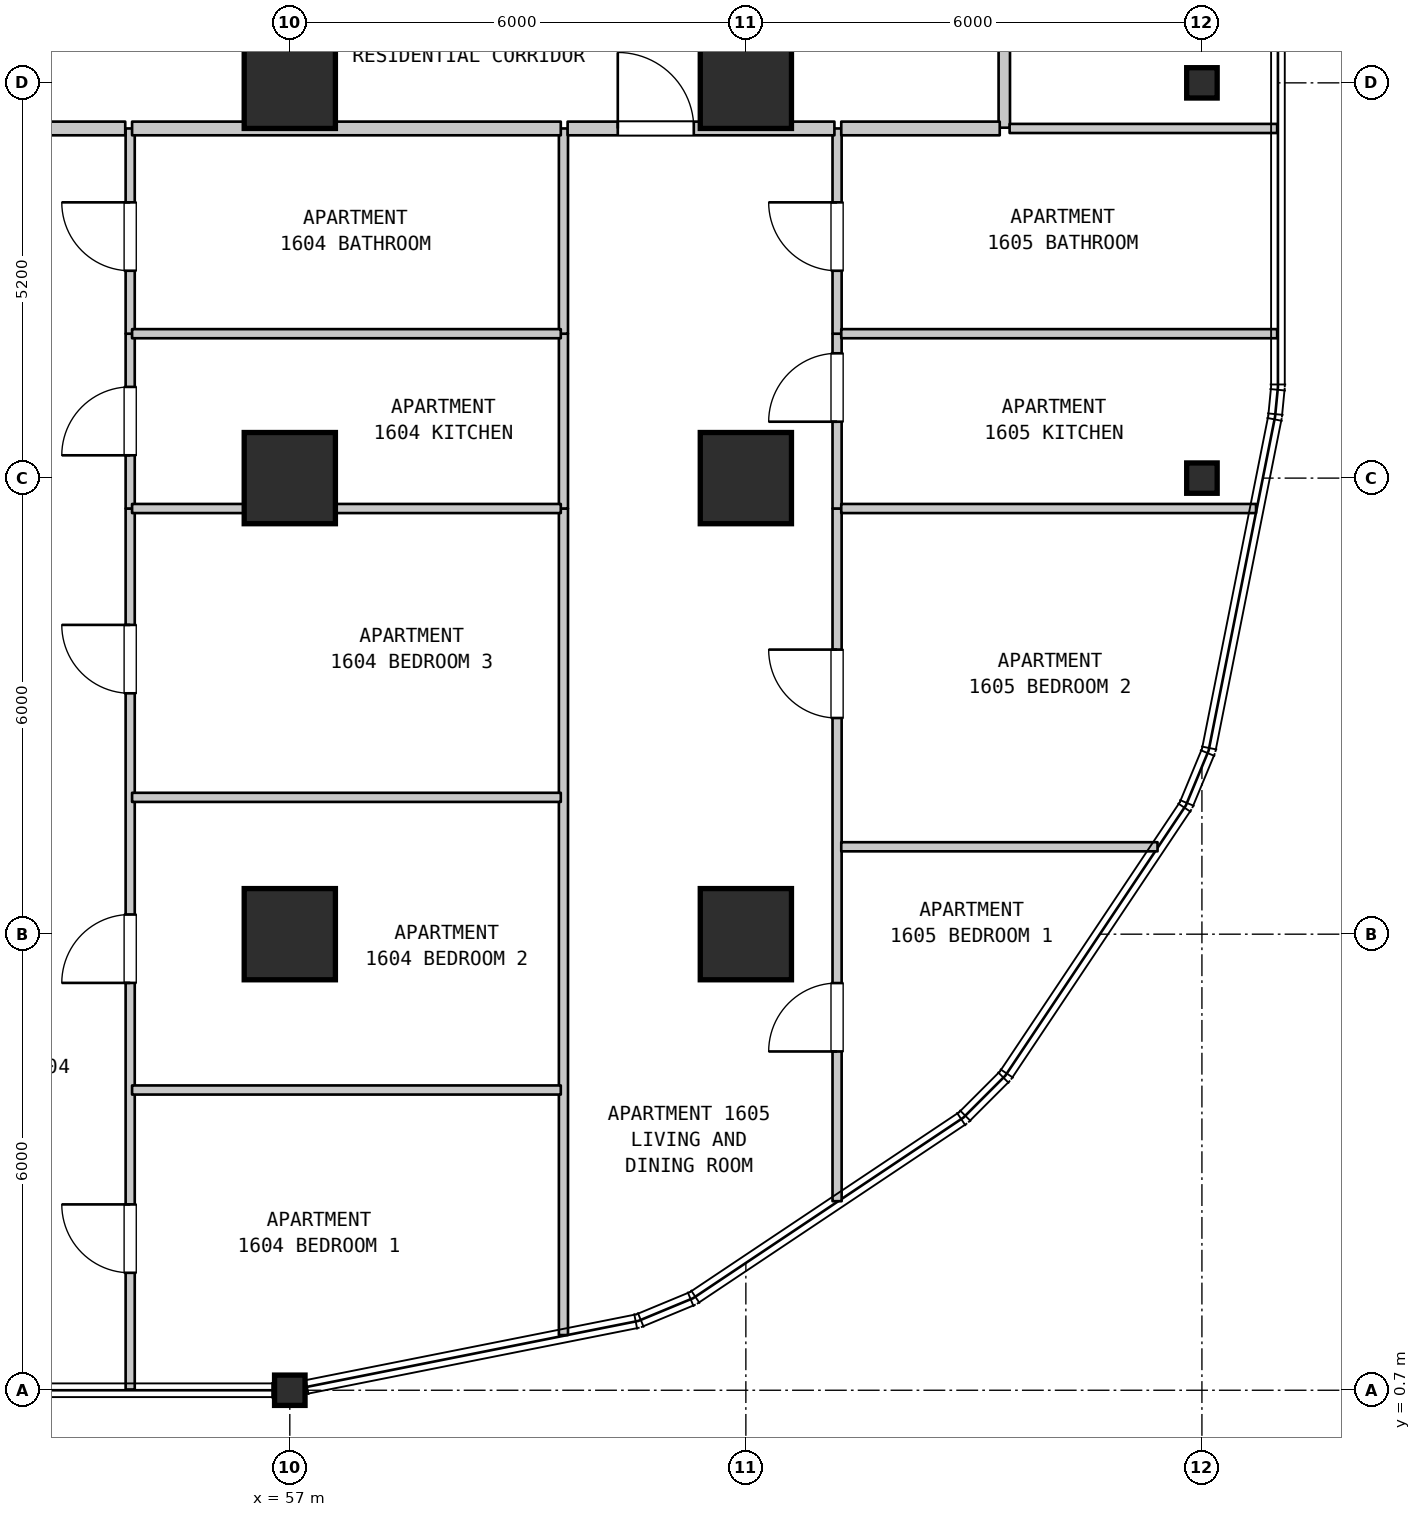
"""IFC4 building model, lengths in metres.
Left out: names, types, materials, properties, quantities, classifications, styles, units other than length and angle.
Written with IfcOpenShell. Run it as: python <this file> out.ifc"""

import sys

from ifc_helpers import new_model, si_unit, direction, frame, frame_2d, origin, origin_2d, place, context, subcontext, project, spatial, rectangle, i_section, extrude, element, fill, save


model = new_model("IFC4")
c1 = context("Model", 3, precision=1e-05, world=origin(), true_north=direction((0.0, 1.0)))
c2 = subcontext(c1, "Body", "Model", "MODEL_VIEW")
j1 = project(units=[si_unit("LENGTHUNIT", "METRE"), si_unit("PLANEANGLEUNIT", "RADIAN")], contexts=[c1])
p1 = place(None, origin())
s1 = spatial("IfcSite", under=j1, at=p1, CompositionType="ELEMENT")
p2 = place(p1, origin())
s2 = spatial("IfcBuilding", under=s1, at=p2, CompositionType="ELEMENT")
p3 = place(p2, frame((0.0, 0.0, 70.1)))
s3 = spatial("IfcBuildingStorey", under=s2, at=p3, CompositionType="ELEMENT", Elevation=70.1)
p4 = place(p3, frame((57.0, 0.7, 0.0), z_axis=(0.0, 0.0, 1.0), x_axis=(1.0, 0.0, 0.0)))
e1 = element("IfcColumn", 1, at=p4, inside=s3, PredefinedType="COLUMN", context=c2, shape_type="SweptSolid", body=[
    extrude(i_section(OverallWidth=0.401, OverallDepth=0.399, WebThickness=0.025, FlangeThickness=0.04, FilletRadius=0.015, at=origin_2d()), origin(), (0.0, 0.0, 1.0), 3.7),
])
for number, where, z_axis, x_axis in (
    (2, (57.0, 6.7, 0.0), (0.0, 0.0, 1.0), (1.0, 0.0, 0.0)),
    (3, (57.0, 12.7, 0.0), (0.0, 0.0, 1.0), (1.0, 0.0, 0.0)),
    (4, (57.0, 17.9, 0.0), (0.0, 0.0, 1.0), (1.0, 0.0, 0.0)),
    (5, (63.0, 6.7, 0.0), (0.0, 0.0, 1.0), (1.0, 0.0, 0.0)),
    (6, (63.0, 12.7, 0.0), (0.0, 0.0, 1.0), (1.0, 0.0, 0.0)),
    (7, (63.0, 17.9, 0.0), (0.0, 0.0, 1.0), (1.0, 0.0, 0.0)),
):
    element("IfcColumn", number, at=place(p3, frame(where, z_axis=z_axis, x_axis=x_axis)), inside=s3, PredefinedType="COLUMN", context=c2, shape_type="SweptSolid", body=[
        extrude(rectangle(XDim=1.2, YDim=1.2, at=origin_2d()), origin(), (0.0, 0.0, 1.0), 3.7),
    ])
for number, where, z_axis, x_axis in (
    (8, (69.0, 12.7, 0.0), (0.0, 0.0, 1.0), (1.0, 0.0, 0.0)),
    (9, (69.0, 17.9, 0.0), (0.0, 0.0, 1.0), (1.0, 0.0, 0.0)),
):
    element("IfcColumn", number, at=place(p3, frame(where, z_axis=z_axis, x_axis=x_axis)), inside=s3, PredefinedType="COLUMN", context=c2, shape_type="SweptSolid", body=[
        extrude(i_section(OverallWidth=0.401, OverallDepth=0.399, WebThickness=0.025, FlangeThickness=0.04, FilletRadius=0.015, at=origin_2d()), origin(), (0.0, 0.0, 1.0), 3.7),
    ])
p5 = place(p3, frame((54.9, 0.71, 0.0), z_axis=(0.0, 0.0, 1.0), x_axis=(0.0, 1.0, 0.0)))
e10 = element("IfcWall", 10, at=p5, inside=s3, PredefinedType="PARTITIONING", context=c2, shape_type="SweptSolid", body=[
    extrude(rectangle(XDim=11.59, YDim=0.12, at=frame_2d((5.795, 0.0))), origin(), (0.0, 0.0, 1.0), 3.385),
])
p6 = place(p5, frame((1.535, 0.0, 0.0)))
e11 = element("IfcOpeningElement", 11, at=p6, cuts=e10, PredefinedType="OPENING", context=c2, shape_type="SweptSolid", body=[
    extrude(rectangle(XDim=0.9, YDim=2.15, at=frame_2d((0.45, 1.075))), frame((0.0, 0.07, 0.0), z_axis=(0.0, -1.0, 0.0), x_axis=(1.0, 0.0, 0.0)), (0.0, 0.0, 1.0), 0.14),
])
p7 = place(p5, frame((5.349, 0.0, 0.0)))
e12 = element("IfcOpeningElement", 12, at=p7, cuts=e10, PredefinedType="OPENING", context=c2, shape_type="SweptSolid", body=[
    extrude(rectangle(XDim=0.9, YDim=2.15, at=frame_2d((0.45, 1.075))), frame((0.0, 0.07, 0.0), z_axis=(0.0, -1.0, 0.0), x_axis=(1.0, 0.0, 0.0)), (0.0, 0.0, 1.0), 0.14),
])
p8 = place(p5, frame((9.159, 0.0, 0.0)))
e13 = element("IfcOpeningElement", 13, at=p8, cuts=e10, PredefinedType="OPENING", context=c2, shape_type="SweptSolid", body=[
    extrude(rectangle(XDim=0.9, YDim=2.15, at=frame_2d((0.45, 1.075))), frame((0.0, 0.07, 0.0), z_axis=(0.0, -1.0, 0.0), x_axis=(1.0, 0.0, 0.0)), (0.0, 0.0, 1.0), 0.14),
])
p9 = place(p3, frame((54.9, 12.3, 0.0), z_axis=(0.0, 0.0, 1.0), x_axis=(0.0, 1.0, 0.0)))
e14 = element("IfcWall", 14, at=p9, inside=s3, PredefinedType="PARTITIONING", context=c2, shape_type="SweptSolid", body=[
    extrude(rectangle(XDim=2.3, YDim=0.12, at=frame_2d((1.15, 0.0))), origin(), (0.0, 0.0, 1.0), 3.385),
])
p10 = place(p9, frame((0.7, 0.0, 0.0)))
e15 = element("IfcOpeningElement", 15, at=p10, cuts=e14, PredefinedType="OPENING", context=c2, shape_type="SweptSolid", body=[
    extrude(rectangle(XDim=0.9, YDim=2.15, at=frame_2d((0.45, 1.075))), frame((0.0, 0.07, 0.0), z_axis=(0.0, -1.0, 0.0), x_axis=(1.0, 0.0, 0.0)), (0.0, 0.0, 1.0), 0.14),
])
p11 = place(p3, frame((54.9, 14.6, 0.0), z_axis=(0.0, 0.0, 1.0), x_axis=(0.0, 1.0, 0.0)))
e16 = element("IfcWall", 16, at=p11, inside=s3, PredefinedType="PARTITIONING", context=c2, shape_type="SweptSolid", body=[
    extrude(rectangle(XDim=2.7, YDim=0.12, at=frame_2d((1.35, 0.0))), origin(), (0.0, 0.0, 1.0), 3.385),
])
p12 = place(p11, frame((0.828, 0.0, 0.0)))
e17 = element("IfcOpeningElement", 17, at=p12, cuts=e16, PredefinedType="OPENING", context=c2, shape_type="SweptSolid", body=[
    extrude(rectangle(XDim=0.9, YDim=2.1, at=frame_2d((0.45, 1.05))), frame((0.0, 0.07, 0.0), z_axis=(0.0, -1.0, 0.0), x_axis=(1.0, 0.0, 0.0)), (0.0, 0.0, 1.0), 0.14),
])
p13 = place(p3, frame((60.6, 1.426, 0.0), z_axis=(0.0, 0.0, 1.0), x_axis=(0.0, 1.0, 0.0)))
e18 = element("IfcWall", 18, at=p13, inside=s3, PredefinedType="PARTITIONING", context=c2, shape_type="SweptSolid", body=[
    extrude(rectangle(XDim=10.874, YDim=0.12, at=frame_2d((5.437, 0.0))), origin(), (0.0, 0.0, 1.0), 3.385),
])
p14 = place(p3, frame((60.6, 12.3, 0.0), z_axis=(0.0, 0.0, 1.0), x_axis=(0.0, 1.0, 0.0)))
e19 = element("IfcWall", 19, at=p14, inside=s3, PredefinedType="PARTITIONING", context=c2, shape_type="SweptSolid", body=[
    extrude(rectangle(XDim=2.3, YDim=0.12, at=frame_2d((1.15, 0.0))), origin(), (0.0, 0.0, 1.0), 3.385),
])
p15 = place(p3, frame((60.6, 14.6, 0.0), z_axis=(0.0, 0.0, 1.0), x_axis=(0.0, 1.0, 0.0)))
e20 = element("IfcWall", 20, at=p15, inside=s3, PredefinedType="PARTITIONING", context=c2, shape_type="SweptSolid", body=[
    extrude(rectangle(XDim=2.7, YDim=0.12, at=frame_2d((1.35, 0.0))), origin(), (0.0, 0.0, 1.0), 3.385),
])
p16 = place(p3, frame((64.2, 3.187, 0.0), z_axis=(0.0, 0.0, 1.0), x_axis=(0.0, 1.0, 0.0)))
e21 = element("IfcWall", 21, at=p16, inside=s3, PredefinedType="PARTITIONING", context=c2, shape_type="SweptSolid", body=[
    extrude(rectangle(XDim=9.113, YDim=0.12, at=frame_2d((4.557, 0.0))), origin(), (0.0, 0.0, 1.0), 3.385),
])
p17 = place(p16, frame((1.97, 0.0, 0.0)))
e22 = element("IfcOpeningElement", 22, at=p17, cuts=e21, PredefinedType="OPENING", context=c2, shape_type="SweptSolid", body=[
    extrude(rectangle(XDim=0.9, YDim=2.15, at=frame_2d((0.45, 1.075))), frame((0.0, 0.07, 0.0), z_axis=(0.0, -1.0, 0.0), x_axis=(1.0, 0.0, 0.0)), (0.0, 0.0, 1.0), 0.14),
])
p18 = place(p16, frame((6.357, 0.0, 0.0)))
e23 = element("IfcOpeningElement", 23, at=p18, cuts=e21, PredefinedType="OPENING", context=c2, shape_type="SweptSolid", body=[
    extrude(rectangle(XDim=0.9, YDim=2.15, at=frame_2d((0.45, 1.075))), frame((0.0, 0.07, 0.0), z_axis=(0.0, -1.0, 0.0), x_axis=(1.0, 0.0, 0.0)), (0.0, 0.0, 1.0), 0.14),
])
p19 = place(p3, frame((64.2, 12.3, 0.0), z_axis=(0.0, 0.0, 1.0), x_axis=(0.0, 1.0, 0.0)))
e24 = element("IfcWall", 24, at=p19, inside=s3, PredefinedType="PARTITIONING", context=c2, shape_type="SweptSolid", body=[
    extrude(rectangle(XDim=2.3, YDim=0.12, at=frame_2d((1.15, 0.0))), origin(), (0.0, 0.0, 1.0), 3.385),
])
p20 = place(p19, frame((1.142, 0.0, 0.0)))
e25 = element("IfcOpeningElement", 25, at=p20, cuts=e24, PredefinedType="OPENING", context=c2, shape_type="SweptSolid", body=[
    extrude(rectangle(XDim=0.9, YDim=2.15, at=frame_2d((0.45, 1.075))), frame((0.0, 0.07, 0.0), z_axis=(0.0, -1.0, 0.0), x_axis=(1.0, 0.0, 0.0)), (0.0, 0.0, 1.0), 0.14),
])
p21 = place(p3, frame((64.2, 14.6, 0.0), z_axis=(0.0, 0.0, 1.0), x_axis=(0.0, 1.0, 0.0)))
e26 = element("IfcWall", 26, at=p21, inside=s3, PredefinedType="PARTITIONING", context=c2, shape_type="SweptSolid", body=[
    extrude(rectangle(XDim=2.7, YDim=0.12, at=frame_2d((1.35, 0.0))), origin(), (0.0, 0.0, 1.0), 3.385),
])
p22 = place(p21, frame((0.828, 0.0, 0.0)))
e27 = element("IfcOpeningElement", 27, at=p22, cuts=e26, PredefinedType="OPENING", context=c2, shape_type="SweptSolid", body=[
    extrude(rectangle(XDim=0.9, YDim=2.1, at=frame_2d((0.45, 1.05))), frame((0.0, 0.07, 0.0), z_axis=(0.0, -1.0, 0.0), x_axis=(1.0, 0.0, 0.0)), (0.0, 0.0, 1.0), 0.14),
])
p23 = place(p3, frame((66.4, 17.31, 0.0), z_axis=(0.0, 0.0, 1.0), x_axis=(0.0, 1.0, 0.0)))
e28 = element("IfcWall", 28, at=p23, inside=s3, PredefinedType="STANDARD", context=c2, shape_type="SweptSolid", body=[
    extrude(rectangle(XDim=2.19, YDim=0.15, at=frame_2d((1.095, 0.0))), origin(), (0.0, 0.0, 1.0), 3.385),
])
p24 = place(p3, frame((54.925, 4.65, 0.0), z_axis=(0.0, 0.0, 1.0), x_axis=(1.0, 0.0, 0.0)))
e29 = element("IfcWall", 29, at=p24, inside=s3, PredefinedType="PARTITIONING", context=c2, shape_type="SweptSolid", body=[
    extrude(rectangle(XDim=5.64, YDim=0.12, at=frame_2d((2.82, 0.0))), origin(), (0.0, 0.0, 1.0), 3.385),
])
p25 = place(p3, frame((64.255, 7.85, 0.0), z_axis=(0.0, 0.0, 1.0), x_axis=(1.0, 0.0, 0.0)))
e30 = element("IfcWall", 30, at=p25, inside=s3, PredefinedType="PARTITIONING", context=c2, shape_type="SweptSolid", body=[
    extrude(rectangle(XDim=4.161, YDim=0.12, at=frame_2d((2.081, 0.0))), origin(), (0.0, 0.0, 1.0), 3.385),
])
for number, where, z_axis, x_axis in (
    (31, (54.925, 8.5, 0.0), (0.0, 0.0, 1.0), (1.0, 0.0, 0.0)),
    (32, (54.925, 12.3, 0.0), (0.0, 0.0, 1.0), (1.0, 0.0, 0.0)),
):
    element("IfcWall", number, at=place(p3, frame(where, z_axis=z_axis, x_axis=x_axis)), inside=s3, PredefinedType="PARTITIONING", context=c2, shape_type="SweptSolid", body=[
        extrude(rectangle(XDim=5.64, YDim=0.12, at=frame_2d((2.82, 0.0))), origin(), (0.0, 0.0, 1.0), 3.385),
    ])
p26 = place(p3, frame((64.255, 12.3, 0.0), z_axis=(0.0, 0.0, 1.0), x_axis=(1.0, 0.0, 0.0)))
e33 = element("IfcWall", 33, at=p26, inside=s3, PredefinedType="PARTITIONING", context=c2, shape_type="SweptSolid", body=[
    extrude(rectangle(XDim=5.457, YDim=0.12, at=frame_2d((2.729, 0.0))), origin(), (0.0, 0.0, 1.0), 3.385),
])
p27 = place(p3, frame((54.925, 14.6, 0.0), z_axis=(0.0, 0.0, 1.0), x_axis=(1.0, 0.0, 0.0)))
e34 = element("IfcWall", 34, at=p27, inside=s3, PredefinedType="PARTITIONING", context=c2, shape_type="SweptSolid", body=[
    extrude(rectangle(XDim=5.64, YDim=0.12, at=frame_2d((2.82, 0.0))), origin(), (0.0, 0.0, 1.0), 3.385),
])
p28 = place(p3, frame((64.255, 14.6, 0.0), z_axis=(0.0, 0.0, 1.0), x_axis=(1.0, 0.0, 0.0)))
e35 = element("IfcWall", 35, at=p28, inside=s3, PredefinedType="PARTITIONING", context=c2, shape_type="SweptSolid", body=[
    extrude(rectangle(XDim=5.735, YDim=0.12, at=frame_2d((2.868, 0.0))), origin(), (0.0, 0.0, 1.0), 3.385),
])
p29 = place(p3, frame((50.875, 17.3, 0.0), z_axis=(0.0, 0.0, 1.0), x_axis=(1.0, 0.0, 0.0)))
e36 = element("IfcWall", 36, at=p29, inside=s3, PredefinedType="STANDARD", context=c2, shape_type="SweptSolid", body=[
    extrude(rectangle(XDim=3.96, YDim=0.18, at=frame_2d((1.98, 0.0))), origin(), (0.0, 0.0, 1.0), 3.385),
])
p30 = place(p29, frame((1.609, 0.0, 0.0)))
e37 = element("IfcOpeningElement", 37, at=p30, cuts=e36, PredefinedType="OPENING", context=c2, shape_type="SweptSolid", body=[
    extrude(rectangle(XDim=1.0, YDim=2.15, at=frame_2d((0.5, 1.075))), frame((0.0, 0.1, 0.0), z_axis=(0.0, -1.0, 0.0), x_axis=(1.0, 0.0, 0.0)), (0.0, 0.0, 1.0), 0.2),
])
p31 = place(p3, frame((54.925, 17.3, 0.0), z_axis=(0.0, 0.0, 1.0), x_axis=(1.0, 0.0, 0.0)))
e38 = element("IfcWall", 38, at=p31, inside=s3, PredefinedType="STANDARD", context=c2, shape_type="SweptSolid", body=[
    extrude(rectangle(XDim=5.64, YDim=0.18, at=frame_2d((2.82, 0.0))), origin(), (0.0, 0.0, 1.0), 3.385),
])
p32 = place(p3, frame((60.655, 17.3, 0.0), z_axis=(0.0, 0.0, 1.0), x_axis=(1.0, 0.0, 0.0)))
e39 = element("IfcWall", 39, at=p32, inside=s3, PredefinedType="STANDARD", context=c2, shape_type="SweptSolid", body=[
    extrude(rectangle(XDim=3.51, YDim=0.18, at=frame_2d((1.755, 0.0))), origin(), (0.0, 0.0, 1.0), 3.385),
])
p33 = place(p32, frame((0.66, 0.0, 0.0)))
e40 = element("IfcOpeningElement", 40, at=p33, cuts=e39, PredefinedType="OPENING", context=c2, shape_type="SweptSolid", body=[
    extrude(rectangle(XDim=1.0, YDim=2.15, at=frame_2d((0.5, 1.075))), frame((0.0, 0.1, 0.0), z_axis=(0.0, -1.0, 0.0), x_axis=(1.0, 0.0, 0.0)), (0.0, 0.0, 1.0), 0.2),
])
p34 = place(p3, frame((64.255, 17.3, 0.0), z_axis=(0.0, 0.0, 1.0), x_axis=(1.0, 0.0, 0.0)))
e41 = element("IfcWall", 41, at=p34, inside=s3, PredefinedType="STANDARD", context=c2, shape_type="SweptSolid", body=[
    extrude(rectangle(XDim=2.085, YDim=0.18, at=frame_2d((1.042, 0.0))), origin(), (0.0, 0.0, 1.0), 3.385),
])
p35 = place(p3, frame((66.47, 17.3, 0.0), z_axis=(0.0, 0.0, 1.0), x_axis=(1.0, 0.0, 0.0)))
e42 = element("IfcWall", 42, at=p35, inside=s3, PredefinedType="PARTITIONING", context=c2, shape_type="SweptSolid", body=[
    extrude(rectangle(XDim=3.52, YDim=0.12, at=frame_2d((1.76, 0.0))), origin(), (0.0, 0.0, 1.0), 3.385),
])
p36 = place(p6, origin())
e43 = element("IfcDoor", 43, at=p36, inside=s3, OperationType="SINGLE_SWING_RIGHT", PredefinedType="DOOR", context=c2, shape_type="SweptSolid", body=[
    extrude(rectangle(XDim=0.9, YDim=2.15, at=frame_2d((0.45, 1.075))), frame((0.0, 0.025, 0.0), z_axis=(0.0, -1.0, 0.0), x_axis=(1.0, 0.0, 0.0)), (0.0, 0.0, 1.0), 0.05),
])
fill(e11, e43)
p37 = place(p7, origin())
e44 = element("IfcDoor", 44, at=p37, inside=s3, OperationType="SINGLE_SWING_LEFT", PredefinedType="DOOR", context=c2, shape_type="SweptSolid", body=[
    extrude(rectangle(XDim=0.9, YDim=2.15, at=frame_2d((0.45, 1.075))), frame((0.0, 0.025, 0.0), z_axis=(0.0, -1.0, 0.0), x_axis=(1.0, 0.0, 0.0)), (0.0, 0.0, 1.0), 0.05),
])
fill(e12, e44)
p38 = place(p8, origin())
e45 = element("IfcDoor", 45, at=p38, inside=s3, OperationType="SINGLE_SWING_RIGHT", PredefinedType="DOOR", context=c2, shape_type="SweptSolid", body=[
    extrude(rectangle(XDim=0.9, YDim=2.15, at=frame_2d((0.45, 1.075))), frame((0.0, 0.025, 0.0), z_axis=(0.0, -1.0, 0.0), x_axis=(1.0, 0.0, 0.0)), (0.0, 0.0, 1.0), 0.05),
])
fill(e13, e45)
p39 = place(p10, origin())
e46 = element("IfcDoor", 46, at=p39, inside=s3, OperationType="SINGLE_SWING_LEFT", PredefinedType="DOOR", context=c2, shape_type="SweptSolid", body=[
    extrude(rectangle(XDim=0.9, YDim=2.15, at=frame_2d((0.45, 1.075))), frame((0.0, 0.025, 0.0), z_axis=(0.0, -1.0, 0.0), x_axis=(1.0, 0.0, 0.0)), (0.0, 0.0, 1.0), 0.05),
])
fill(e15, e46)
p40 = place(p12, origin())
e47 = element("IfcDoor", 47, at=p40, inside=s3, OperationType="SINGLE_SWING_RIGHT", PredefinedType="DOOR", context=c2, shape_type="SweptSolid", body=[
    extrude(rectangle(XDim=0.9, YDim=2.1, at=frame_2d((0.45, 1.05))), frame((0.0, 0.025, 0.0), z_axis=(0.0, -1.0, 0.0), x_axis=(1.0, 0.0, 0.0)), (0.0, 0.0, 1.0), 0.05),
])
fill(e17, e47)
p41 = place(p17, origin())
e48 = element("IfcDoor", 48, at=p41, inside=s3, OperationType="SINGLE_SWING_LEFT", PredefinedType="DOOR", context=c2, shape_type="SweptSolid", body=[
    extrude(rectangle(XDim=0.9, YDim=2.15, at=frame_2d((0.45, 1.075))), frame((0.0, 0.025, 0.0), z_axis=(0.0, -1.0, 0.0), x_axis=(1.0, 0.0, 0.0)), (0.0, 0.0, 1.0), 0.05),
])
fill(e22, e48)
p42 = place(p18, origin())
e49 = element("IfcDoor", 49, at=p42, inside=s3, OperationType="SINGLE_SWING_RIGHT", PredefinedType="DOOR", context=c2, shape_type="SweptSolid", body=[
    extrude(rectangle(XDim=0.9, YDim=2.15, at=frame_2d((0.45, 1.075))), frame((0.0, 0.025, 0.0), z_axis=(0.0, -1.0, 0.0), x_axis=(1.0, 0.0, 0.0)), (0.0, 0.0, 1.0), 0.05),
])
fill(e23, e49)
p43 = place(p20, origin())
e50 = element("IfcDoor", 50, at=p43, inside=s3, OperationType="SINGLE_SWING_LEFT", PredefinedType="DOOR", context=c2, shape_type="SweptSolid", body=[
    extrude(rectangle(XDim=0.9, YDim=2.15, at=frame_2d((0.45, 1.075))), frame((0.0, 0.025, 0.0), z_axis=(0.0, -1.0, 0.0), x_axis=(1.0, 0.0, 0.0)), (0.0, 0.0, 1.0), 0.05),
])
fill(e25, e50)
p44 = place(p22, origin())
e51 = element("IfcDoor", 51, at=p44, inside=s3, OperationType="SINGLE_SWING_RIGHT", PredefinedType="DOOR", context=c2, shape_type="SweptSolid", body=[
    extrude(rectangle(XDim=0.9, YDim=2.1, at=frame_2d((0.45, 1.05))), frame((0.0, 0.025, 0.0), z_axis=(0.0, -1.0, 0.0), x_axis=(1.0, 0.0, 0.0)), (0.0, 0.0, 1.0), 0.05),
])
fill(e27, e51)
p45 = place(p33, origin())
e52 = element("IfcDoor", 52, at=p45, inside=s3, OperationType="SINGLE_SWING_LEFT", PredefinedType="DOOR", context=c2, shape_type="SweptSolid", body=[
    extrude(rectangle(XDim=1.0, YDim=2.15, at=frame_2d((0.5, 1.075))), frame((0.0, 0.025, 0.0), z_axis=(0.0, -1.0, 0.0), x_axis=(1.0, 0.0, 0.0)), (0.0, 0.0, 1.0), 0.05),
])
fill(e40, e52)
save(model, sys.argv[1])
